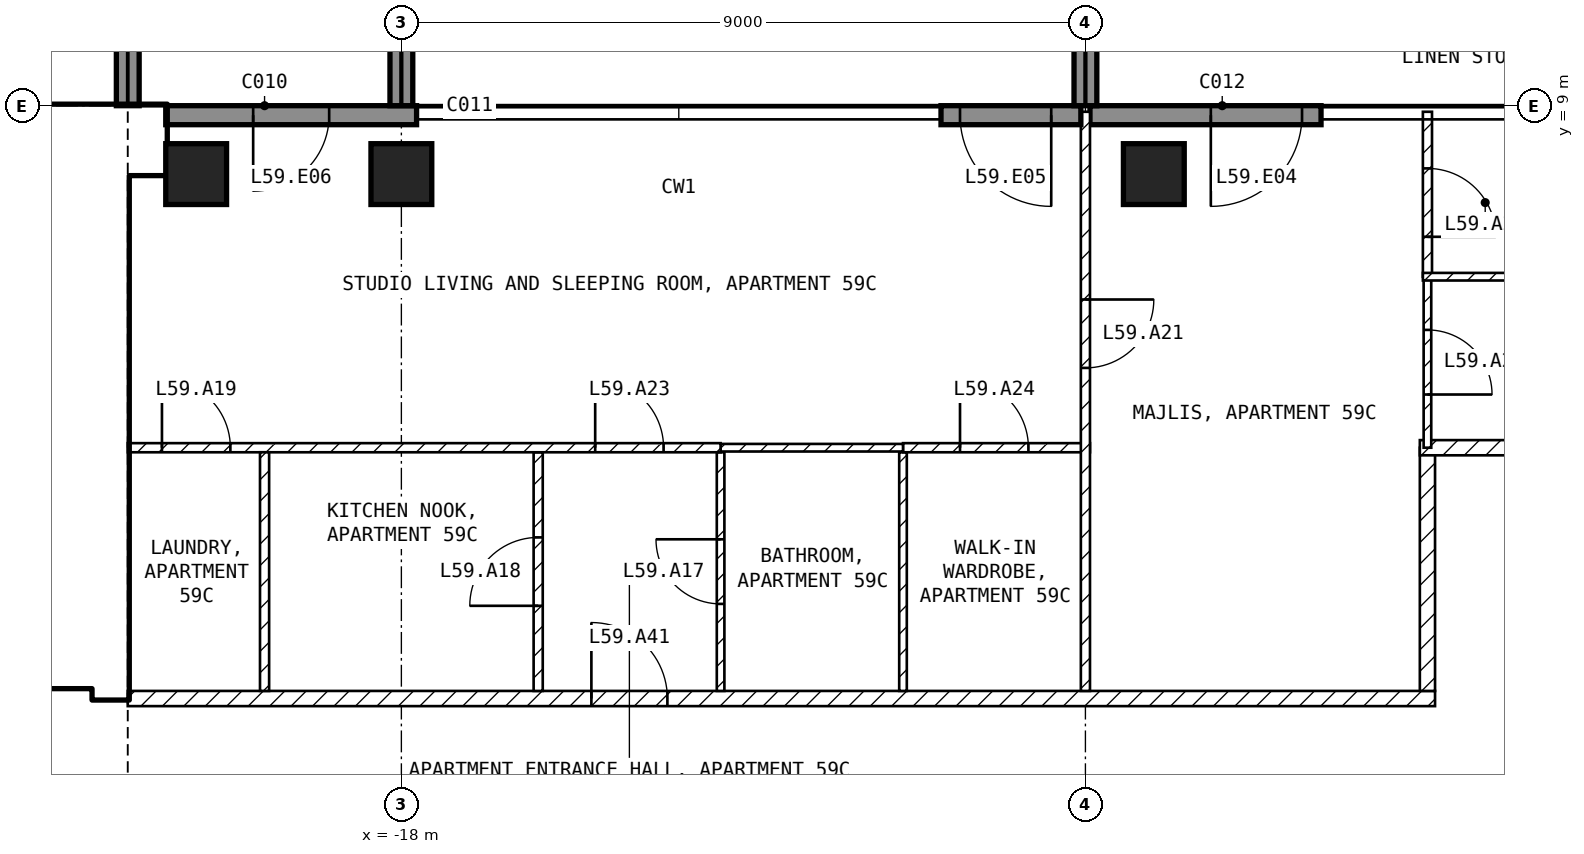
"""IFC4 building model, lengths in metres.
Left out: names, types, materials, properties, quantities, classifications, styles, units other than length and angle.
Written with IfcOpenShell. Run it as: python <this file> out.ifc"""

import sys

from ifc_helpers import new_model, si_unit, direction, frame, frame_2d, origin, origin_2d, place, context, subcontext, project, spatial, rectangle, extrude, element, fill, save


model = new_model("IFC4")
c1 = context("Model", 3, precision=1e-05, world=origin(), true_north=direction((0.0, 1.0)))
c2 = subcontext(c1, "Body", "Model", "MODEL_VIEW")
j1 = project(units=[si_unit("LENGTHUNIT", "METRE"), si_unit("PLANEANGLEUNIT", "RADIAN")], contexts=[c1])
p1 = place(None, origin())
s1 = spatial("IfcSite", under=j1, at=p1, CompositionType="ELEMENT")
p2 = place(p1, origin())
s2 = spatial("IfcBuilding", under=s1, at=p2, CompositionType="ELEMENT")
p3 = place(p2, frame((0.0, 0.0, 236.0)))
s3 = spatial("IfcBuildingStorey", under=s2, at=p3, CompositionType="ELEMENT", Elevation=236.0)
for number, where, z_axis, x_axis in (
    (1, (-20.7, 8.1, -0.25), (0.0, 0.0, 1.0), (1.0, 0.0, 0.0)),
    (2, (-18.0, 8.1, -0.25), (0.0, 0.0, 1.0), (1.0, 0.0, 0.0)),
    (3, (-8.1, 8.1, -0.25), (0.0, 0.0, 1.0), (1.0, 0.0, 0.0)),
):
    element("IfcColumn", number, at=place(p3, frame(where, z_axis=z_axis, x_axis=x_axis)), inside=s3, PredefinedType="COLUMN", context=c2, shape_type="SweptSolid", body=[
        extrude(rectangle(XDim=0.8, YDim=0.8, at=origin_2d()), origin(), (0.0, 0.0, 1.0), 3.5),
    ])
p4 = place(p3, frame((-5.9, 8.875, 0.0), z_axis=(0.0, 0.0, 1.0), x_axis=(-1.0, 0.0, 0.0)))
e4 = element("IfcWall", 4, at=p4, inside=s3, PredefinedType="SOLIDWALL", context=c2, shape_type="SweptSolid", body=[
    extrude(rectangle(XDim=3.04, YDim=0.25, at=frame_2d((1.52, 0.0))), origin(), (0.0, 0.0, 1.0), 3.25),
])
p5 = place(p4, frame((0.25, 0.0, 0.0)))
e5 = element("IfcOpeningElement", 5, at=p5, cuts=e4, PredefinedType="OPENING", context=c2, shape_type="SweptSolid", body=[
    extrude(rectangle(XDim=1.2, YDim=2.4, at=frame_2d((0.6, 1.2))), frame((0.0, 0.135, 0.0), z_axis=(0.0, -1.0, 0.0), x_axis=(1.0, 0.0, 0.0)), (0.0, 0.0, 1.0), 0.27),
])
p6 = place(p3, frame((-9.06, 8.875, 0.0), z_axis=(0.0, 0.0, 1.0), x_axis=(-1.0, 0.0, 0.0)))
e6 = element("IfcWall", 6, at=p6, inside=s3, PredefinedType="SOLIDWALL", context=c2, shape_type="SweptSolid", body=[
    extrude(rectangle(XDim=1.84, YDim=0.25, at=frame_2d((0.92, 0.0))), origin(), (0.0, 0.0, 1.0), 3.25),
])
p7 = place(p6, frame((0.39, 0.0, 0.0)))
e7 = element("IfcOpeningElement", 7, at=p7, cuts=e6, PredefinedType="OPENING", context=c2, shape_type="SweptSolid", body=[
    extrude(rectangle(XDim=1.2, YDim=2.4, at=frame_2d((0.6, 1.2))), frame((0.0, 0.135, 0.0), z_axis=(0.0, -1.0, 0.0), x_axis=(1.0, 0.0, 0.0)), (0.0, 0.0, 1.0), 0.27),
])
p8 = place(p3, frame((-17.8, 8.875, 0.0), z_axis=(0.0, 0.0, 1.0), x_axis=(-1.0, 0.0, 0.0)))
e8 = element("IfcWall", 8, at=p8, inside=s3, PredefinedType="SOLIDWALL", context=c2, shape_type="SweptSolid", body=[
    extrude(rectangle(XDim=3.3, YDim=0.25, at=frame_2d((1.65, 0.0))), origin(), (0.0, 0.0, 1.0), 3.25),
])
p9 = place(p8, frame((1.15, 0.0, 0.0)))
e9 = element("IfcOpeningElement", 9, at=p9, cuts=e8, PredefinedType="OPENING", context=c2, shape_type="SweptSolid", body=[
    extrude(rectangle(XDim=1.0, YDim=2.4, at=frame_2d((0.5, 1.2))), frame((0.0, 0.135, 0.0), z_axis=(0.0, -1.0, 0.0), x_axis=(1.0, 0.0, 0.0)), (0.0, 0.0, 1.0), 0.27),
])
for number, where, z_axis, x_axis in (
    (10, (-21.6, 9.0, 0.0), (0.0, 0.0, 1.0), (0.0, 1.0, 0.0)),
    (11, (-18.0, 9.0, 0.0), (0.0, 0.0, 1.0), (0.0, 1.0, 0.0)),
    (12, (-9.0, 9.0, 0.0), (0.0, 0.0, 1.0), (0.0, 1.0, 0.0)),
):
    element("IfcWall", number, at=place(p3, frame(where, z_axis=z_axis, x_axis=x_axis)), inside=s3, PredefinedType="SOLIDWALL", context=c2, shape_type="SweptSolid", body=[
        extrude(rectangle(XDim=2.7, YDim=0.3, at=frame_2d((1.35, 0.0))), origin(), (0.0, 0.0, 1.0), 3.25),
    ])
p10 = place(p3, frame((-29.75, 8.55, 0.0), z_axis=(0.0, 0.0, 1.0), x_axis=(1.0, 0.0, 0.0)))
e13 = element("IfcWall", 13, at=p10, inside=s3, PredefinedType="SHEAR", context=c2, shape_type="SweptSolid", body=[
    extrude(rectangle(XDim=8.65, YDim=0.9, at=frame_2d((4.325, 0.0))), origin(), (0.0, 0.0, 1.0), 3.25),
])
p11 = place(p3, frame((-21.825, 1.2, 0.0), z_axis=(0.0, 0.0, 1.0), x_axis=(0.0, 1.0, 0.0)))
e14 = element("IfcWall", 14, at=p11, inside=s3, PredefinedType="SHEAR", context=c2, shape_type="SweptSolid", body=[
    extrude(rectangle(XDim=6.9, YDim=0.45, at=frame_2d((3.45, 0.0))), origin(), (0.0, 0.0, 1.0), 3.25),
])
p12 = place(p3, frame((-33.35, 1.45, 0.0), z_axis=(0.0, 0.0, 1.0), x_axis=(1.0, 0.0, 0.0)))
e15 = element("IfcWall", 15, at=p12, inside=s3, PredefinedType="SOLIDWALL", context=c2, shape_type="SweptSolid", body=[
    extrude(rectangle(XDim=11.3, YDim=0.2, at=frame_2d((5.65, 0.0))), origin(), (0.0, 0.0, 1.0), 3.25),
])
p13 = place(p12, frame((9.55, 0.0, 0.0)))
e16 = element("IfcOpeningElement", 16, at=p13, cuts=e15, PredefinedType="OPENING", context=c2, shape_type="SweptSolid", body=[
    extrude(rectangle(XDim=1.0, YDim=2.1, at=frame_2d((0.5, 1.05))), frame((0.0, 0.11, 0.0), z_axis=(0.0, -1.0, 0.0), x_axis=(1.0, 0.0, 0.0)), (0.0, 0.0, 1.0), 0.22),
])
p14 = place(p12, frame((7.05, 0.0, 0.0)))
e17 = element("IfcOpeningElement", 17, at=p14, cuts=e15, PredefinedType="OPENING", context=c2, shape_type="SweptSolid", body=[
    extrude(rectangle(XDim=1.0, YDim=2.1, at=frame_2d((0.5, 1.05))), frame((0.0, 0.11, 0.0), z_axis=(0.0, -1.0, 0.0), x_axis=(1.0, 0.0, 0.0)), (0.0, 0.0, 1.0), 0.22),
])
p15 = place(p12, frame((1.175, 0.0, 0.0)))
e18 = element("IfcOpeningElement", 18, at=p15, cuts=e15, PredefinedType="OPENING", context=c2, shape_type="SweptSolid", body=[
    extrude(rectangle(XDim=0.9, YDim=2.1, at=frame_2d((0.45, 1.05))), frame((0.0, 0.11, 0.0), z_axis=(0.0, -1.0, 0.0), x_axis=(1.0, 0.0, 0.0)), (0.0, 0.0, 1.0), 0.22),
])
p16 = place(p3, frame((-28.35, 5.15, 0.0), z_axis=(0.0, 0.0, 1.0), x_axis=(1.0, 0.0, 0.0)))
e19 = element("IfcWall", 19, at=p16, inside=s3, PredefinedType="SOLIDWALL", context=c2, shape_type="SweptSolid", body=[
    extrude(rectangle(XDim=6.3, YDim=0.2, at=frame_2d((3.15, 0.0))), origin(), (0.0, 0.0, 1.0), 3.25),
])
p17 = place(p16, frame((5.1, 0.0, 0.0)))
e20 = element("IfcOpeningElement", 20, at=p17, cuts=e19, PredefinedType="OPENING", context=c2, shape_type="SweptSolid", body=[
    extrude(rectangle(XDim=1.0, YDim=2.1, at=frame_2d((0.5, 1.05))), frame((0.0, 0.11, 0.0), z_axis=(0.0, -1.0, 0.0), x_axis=(1.0, 0.0, 0.0)), (0.0, 0.0, 1.0), 0.22),
])
p18 = place(p3, frame((-21.6, 1.2, 0.0), z_axis=(0.0, 0.0, 1.0), x_axis=(1.0, 0.0, 0.0)))
e21 = element("IfcWall", 21, at=p18, inside=s3, PredefinedType="PARTITIONING", context=c2, shape_type="SweptSolid", body=[
    extrude(rectangle(XDim=17.2, YDim=0.2, at=frame_2d((8.6, 0.0))), origin(), (0.0, 0.0, 1.0), 3.25),
])
p19 = place(p18, frame((6.1, 0.0, 0.0)))
e22 = element("IfcOpeningElement", 22, at=p19, cuts=e21, PredefinedType="OPENING", context=c2, shape_type="SweptSolid", body=[
    extrude(rectangle(XDim=1.0, YDim=2.1, at=frame_2d((0.5, 1.05))), frame((0.0, 0.11, 0.0), z_axis=(0.0, -1.0, 0.0), x_axis=(1.0, 0.0, 0.0)), (0.0, 0.0, 1.0), 0.22),
])
p20 = place(p3, frame((-4.5, 1.3, 0.0), z_axis=(0.0, 0.0, 1.0), x_axis=(0.0, 1.0, 0.0)))
e23 = element("IfcWall", 23, at=p20, inside=s3, PredefinedType="PARTITIONING", context=c2, shape_type="SweptSolid", body=[
    extrude(rectangle(XDim=3.2, YDim=0.2, at=frame_2d((1.6, 0.0))), origin(), (0.0, 0.0, 1.0), 3.25),
])
p21 = place(p3, frame((-4.6, 4.5, 0.0), z_axis=(0.0, 0.0, 1.0), x_axis=(1.0, 0.0, 0.0)))
e24 = element("IfcWall", 24, at=p21, inside=s3, PredefinedType="PARTITIONING", context=c2, shape_type="SweptSolid", body=[
    extrude(rectangle(XDim=3.5, YDim=0.2, at=frame_2d((1.75, 0.0))), origin(), (0.0, 0.0, 1.0), 3.25),
])
p22 = place(p3, frame((-11.4, 1.3, 0.0), z_axis=(0.0, 0.0, 1.0), x_axis=(0.0, 1.0, 0.0)))
e25 = element("IfcWall", 25, at=p22, inside=s3, PredefinedType="PARTITIONING", context=c2, shape_type="SweptSolid", body=[
    extrude(rectangle(XDim=3.14, YDim=0.1, at=frame_2d((1.57, 0.0))), origin(), (0.0, 0.0, 1.0), 3.25),
])
p23 = place(p3, frame((-11.4, 4.5, 0.0), z_axis=(0.0, 0.0, 1.0), x_axis=(1.0, 0.0, 0.0)))
e26 = element("IfcWall", 26, at=p23, inside=s3, PredefinedType="PARTITIONING", context=c2, shape_type="SweptSolid", body=[
    extrude(rectangle(XDim=2.46, YDim=0.12, at=frame_2d((1.23, 0.0))), origin(), (0.0, 0.0, 1.0), 3.25),
])
p24 = place(p23, frame((0.75, 0.0, 0.0)))
e27 = element("IfcOpeningElement", 27, at=p24, cuts=e26, PredefinedType="OPENING", context=c2, shape_type="SweptSolid", body=[
    extrude(rectangle(XDim=0.9, YDim=2.1, at=frame_2d((0.45, 1.05))), frame((0.0, 0.07, 0.0), z_axis=(0.0, -1.0, 0.0), x_axis=(1.0, 0.0, 0.0)), (0.0, 0.0, 1.0), 0.14),
])
p25 = place(p3, frame((-9.0, 8.92, 0.0), z_axis=(0.0, 0.0, 1.0), x_axis=(0.0, -1.0, 0.0)))
e28 = element("IfcWall", 28, at=p25, inside=s3, PredefinedType="PARTITIONING", context=c2, shape_type="SweptSolid", body=[
    extrude(rectangle(XDim=7.62, YDim=0.12, at=frame_2d((3.81, 0.0))), origin(), (0.0, 0.0, 1.0), 3.25),
])
p26 = place(p25, frame((2.47, 0.0, 0.0)))
e29 = element("IfcOpeningElement", 29, at=p26, cuts=e28, PredefinedType="OPENING", context=c2, shape_type="SweptSolid", body=[
    extrude(rectangle(XDim=0.9, YDim=2.1, at=frame_2d((0.45, 1.05))), frame((0.0, 0.07, 0.0), z_axis=(0.0, -1.0, 0.0), x_axis=(1.0, 0.0, 0.0)), (0.0, 0.0, 1.0), 0.14),
])
p27 = place(p3, frame((-13.8, 1.3, 0.0), z_axis=(0.0, 0.0, 1.0), x_axis=(0.0, 1.0, 0.0)))
e30 = element("IfcWall", 30, at=p27, inside=s3, PredefinedType="PARTITIONING", context=c2, shape_type="SweptSolid", body=[
    extrude(rectangle(XDim=3.14, YDim=0.1, at=frame_2d((1.57, 0.0))), origin(), (0.0, 0.0, 1.0), 3.25),
])
p28 = place(p27, frame((1.145, 0.0, 0.0)))
e31 = element("IfcOpeningElement", 31, at=p28, cuts=e30, PredefinedType="OPENING", context=c2, shape_type="SweptSolid", body=[
    extrude(rectangle(XDim=0.85, YDim=2.1, at=frame_2d((0.425, 1.05))), frame((0.0, 0.06, 0.0), z_axis=(0.0, -1.0, 0.0), x_axis=(1.0, 0.0, 0.0)), (0.0, 0.0, 1.0), 0.12),
])
p29 = place(p3, frame((-13.8, 4.5, 0.0), z_axis=(0.0, 0.0, 1.0), x_axis=(1.0, 0.0, 0.0)))
e32 = element("IfcWall", 32, at=p29, inside=s3, PredefinedType="PARTITIONING", context=c2, shape_type="SweptSolid", body=[
    extrude(rectangle(XDim=2.4, YDim=0.1, at=frame_2d((1.2, 0.0))), origin(), (0.0, 0.0, 1.0), 3.25),
])
p30 = place(p3, frame((-16.2, 1.3, 0.0), z_axis=(0.0, 0.0, 1.0), x_axis=(0.0, 1.0, 0.0)))
e33 = element("IfcWall", 33, at=p30, inside=s3, PredefinedType="PARTITIONING", context=c2, shape_type="SweptSolid", body=[
    extrude(rectangle(XDim=3.14, YDim=0.12, at=frame_2d((1.57, 0.0))), origin(), (0.0, 0.0, 1.0), 3.25),
])
p31 = place(p30, frame((1.12, 0.0, 0.0)))
e34 = element("IfcOpeningElement", 34, at=p31, cuts=e33, PredefinedType="OPENING", context=c2, shape_type="SweptSolid", body=[
    extrude(rectangle(XDim=0.9, YDim=2.1, at=frame_2d((0.45, 1.05))), frame((0.0, 0.07, 0.0), z_axis=(0.0, -1.0, 0.0), x_axis=(1.0, 0.0, 0.0)), (0.0, 0.0, 1.0), 0.14),
])
p32 = place(p3, frame((-21.6, 4.5, 0.0), z_axis=(0.0, 0.0, 1.0), x_axis=(1.0, 0.0, 0.0)))
e35 = element("IfcWall", 35, at=p32, inside=s3, PredefinedType="PARTITIONING", context=c2, shape_type="SweptSolid", body=[
    extrude(rectangle(XDim=7.8, YDim=0.12, at=frame_2d((3.9, 0.0))), origin(), (0.0, 0.0, 1.0), 3.25),
])
p33 = place(p32, frame((0.45, 0.0, 0.0)))
e36 = element("IfcOpeningElement", 36, at=p33, cuts=e35, PredefinedType="OPENING", context=c2, shape_type="SweptSolid", body=[
    extrude(rectangle(XDim=0.9, YDim=2.1, at=frame_2d((0.45, 1.05))), frame((0.0, 0.07, 0.0), z_axis=(0.0, -1.0, 0.0), x_axis=(1.0, 0.0, 0.0)), (0.0, 0.0, 1.0), 0.14),
])
p34 = place(p32, frame((6.15, 0.0, 0.0)))
e37 = element("IfcOpeningElement", 37, at=p34, cuts=e35, PredefinedType="OPENING", context=c2, shape_type="SweptSolid", body=[
    extrude(rectangle(XDim=0.9, YDim=2.1, at=frame_2d((0.45, 1.05))), frame((0.0, 0.07, 0.0), z_axis=(0.0, -1.0, 0.0), x_axis=(1.0, 0.0, 0.0)), (0.0, 0.0, 1.0), 0.14),
])
p35 = place(p3, frame((-19.8, 1.3, 0.0), z_axis=(0.0, 0.0, 1.0), x_axis=(0.0, 1.0, 0.0)))
e38 = element("IfcWall", 38, at=p35, inside=s3, PredefinedType="PARTITIONING", context=c2, shape_type="SweptSolid", body=[
    extrude(rectangle(XDim=3.14, YDim=0.12, at=frame_2d((1.57, 0.0))), origin(), (0.0, 0.0, 1.0), 3.25),
])
p36 = place(p3, frame((-4.5, 6.75, 0.0), z_axis=(0.0, 0.0, 1.0), x_axis=(0.0, -1.0, 0.0)))
e39 = element("IfcWall", 39, at=p36, inside=s3, PredefinedType="PARTITIONING", context=c2, shape_type="SweptSolid", body=[
    extrude(rectangle(XDim=2.25, YDim=0.1, at=frame_2d((1.125, 0.0))), origin(), (0.0, 0.0, 1.0), 3.25),
])
p37 = place(p36, frame((0.7, 0.0, 0.0)))
e40 = element("IfcOpeningElement", 40, at=p37, cuts=e39, PredefinedType="OPENING", context=c2, shape_type="SweptSolid", body=[
    extrude(rectangle(XDim=0.85, YDim=2.1, at=frame_2d((0.425, 1.05))), frame((0.0, 0.06, 0.0), z_axis=(0.0, -1.0, 0.0), x_axis=(1.0, 0.0, 0.0)), (0.0, 0.0, 1.0), 0.12),
])
p38 = place(p3, frame((-4.5, 8.92, 0.0), z_axis=(0.0, 0.0, 1.0), x_axis=(0.0, -1.0, 0.0)))
e41 = element("IfcWall", 41, at=p38, inside=s3, PredefinedType="PARTITIONING", context=c2, shape_type="SweptSolid", body=[
    extrude(rectangle(XDim=2.17, YDim=0.12, at=frame_2d((1.085, 0.0))), origin(), (0.0, 0.0, 1.0), 3.25),
])
p39 = place(p38, frame((0.745, 0.0, 0.0)))
e42 = element("IfcOpeningElement", 42, at=p39, cuts=e41, PredefinedType="OPENING", context=c2, shape_type="SweptSolid", body=[
    extrude(rectangle(XDim=0.9, YDim=2.1, at=frame_2d((0.45, 1.05))), frame((0.0, 0.07, 0.0), z_axis=(0.0, -1.0, 0.0), x_axis=(1.0, 0.0, 0.0)), (0.0, 0.0, 1.0), 0.14),
])
p40 = place(p3, frame((-4.56, 6.75, 0.0), z_axis=(0.0, 0.0, 1.0), x_axis=(1.0, 0.0, 0.0)))
e43 = element("IfcWall", 43, at=p40, inside=s3, PredefinedType="PARTITIONING", context=c2, shape_type="SweptSolid", body=[
    extrude(rectangle(XDim=3.46, YDim=0.1, at=frame_2d((1.73, 0.0))), origin(), (0.0, 0.0, 1.0), 3.25),
])
p41 = place(p5, origin())
e44 = element("IfcDoor", 44, at=p41, inside=s3, OperationType="SINGLE_SWING_RIGHT", PredefinedType="DOOR", context=c2, shape_type="SweptSolid", body=[
    extrude(rectangle(XDim=1.2, YDim=2.4, at=frame_2d((0.6, 1.2))), frame((0.0, 0.025, 0.0), z_axis=(0.0, -1.0, 0.0), x_axis=(1.0, 0.0, 0.0)), (0.0, 0.0, 1.0), 0.05),
])
fill(e5, e44)
p42 = place(p7, origin())
e45 = element("IfcDoor", 45, at=p42, inside=s3, OperationType="SINGLE_SWING_LEFT", PredefinedType="DOOR", context=c2, shape_type="SweptSolid", body=[
    extrude(rectangle(XDim=1.2, YDim=2.4, at=frame_2d((0.6, 1.2))), frame((0.0, 0.025, 0.0), z_axis=(0.0, -1.0, 0.0), x_axis=(1.0, 0.0, 0.0)), (0.0, 0.0, 1.0), 0.05),
])
fill(e7, e45)
p43 = place(p9, origin())
e46 = element("IfcDoor", 46, at=p43, inside=s3, OperationType="SINGLE_SWING_RIGHT", PredefinedType="DOOR", context=c2, shape_type="SweptSolid", body=[
    extrude(rectangle(XDim=1.0, YDim=2.4, at=frame_2d((0.5, 1.2))), frame((0.0, 0.025, 0.0), z_axis=(0.0, -1.0, 0.0), x_axis=(1.0, 0.0, 0.0)), (0.0, 0.0, 1.0), 0.05),
])
fill(e9, e46)
p44 = place(p17, origin())
e47 = element("IfcDoor", 47, at=p44, inside=s3, OperationType="SINGLE_SWING_LEFT", PredefinedType="DOOR", context=c2, shape_type="SweptSolid", body=[
    extrude(rectangle(XDim=1.0, YDim=2.1, at=frame_2d((0.5, 1.05))), frame((0.0, 0.025, 0.0), z_axis=(0.0, -1.0, 0.0), x_axis=(1.0, 0.0, 0.0)), (0.0, 0.0, 1.0), 0.05),
])
fill(e20, e47)
p45 = place(p28, origin())
e48 = element("IfcDoor", 48, at=p45, inside=s3, OperationType="SINGLE_SWING_RIGHT", PredefinedType="DOOR", context=c2, shape_type="SweptSolid", body=[
    extrude(rectangle(XDim=0.85, YDim=2.1, at=frame_2d((0.425, 1.05))), frame((0.0, 0.025, 0.0), z_axis=(0.0, -1.0, 0.0), x_axis=(1.0, 0.0, 0.0)), (0.0, 0.0, 1.0), 0.05),
])
fill(e31, e48)
p46 = place(p31, origin())
e49 = element("IfcDoor", 49, at=p46, inside=s3, OperationType="SINGLE_SWING_LEFT", PredefinedType="DOOR", context=c2, shape_type="SweptSolid", body=[
    extrude(rectangle(XDim=0.9, YDim=2.1, at=frame_2d((0.45, 1.05))), frame((0.0, 0.025, 0.0), z_axis=(0.0, -1.0, 0.0), x_axis=(1.0, 0.0, 0.0)), (0.0, 0.0, 1.0), 0.05),
])
fill(e34, e49)
p47 = place(p33, origin())
e50 = element("IfcDoor", 50, at=p47, inside=s3, OperationType="SINGLE_SWING_LEFT", PredefinedType="DOOR", context=c2, shape_type="SweptSolid", body=[
    extrude(rectangle(XDim=0.9, YDim=2.1, at=frame_2d((0.45, 1.05))), frame((0.0, 0.025, 0.0), z_axis=(0.0, -1.0, 0.0), x_axis=(1.0, 0.0, 0.0)), (0.0, 0.0, 1.0), 0.05),
])
fill(e36, e50)
p48 = place(p39, origin())
e51 = element("IfcDoor", 51, at=p48, inside=s3, OperationType="SINGLE_SWING_RIGHT", PredefinedType="DOOR", context=c2, shape_type="SweptSolid", body=[
    extrude(rectangle(XDim=0.9, YDim=2.1, at=frame_2d((0.45, 1.05))), frame((0.0, 0.025, 0.0), z_axis=(0.0, -1.0, 0.0), x_axis=(1.0, 0.0, 0.0)), (0.0, 0.0, 1.0), 0.05),
])
fill(e42, e51)
p49 = place(p26, origin())
e52 = element("IfcDoor", 52, at=p49, inside=s3, OperationType="SINGLE_SWING_LEFT", PredefinedType="DOOR", context=c2, shape_type="SweptSolid", body=[
    extrude(rectangle(XDim=0.9, YDim=2.1, at=frame_2d((0.45, 1.05))), frame((0.0, 0.025, 0.0), z_axis=(0.0, -1.0, 0.0), x_axis=(1.0, 0.0, 0.0)), (0.0, 0.0, 1.0), 0.05),
])
fill(e29, e52)
p50 = place(p37, origin())
e53 = element("IfcDoor", 53, at=p50, inside=s3, OperationType="SINGLE_SWING_RIGHT", PredefinedType="DOOR", context=c2, shape_type="SweptSolid", body=[
    extrude(rectangle(XDim=0.85, YDim=2.1, at=frame_2d((0.425, 1.05))), frame((0.0, 0.025, 0.0), z_axis=(0.0, -1.0, 0.0), x_axis=(1.0, 0.0, 0.0)), (0.0, 0.0, 1.0), 0.05),
])
fill(e40, e53)
p51 = place(p34, origin())
e54 = element("IfcDoor", 54, at=p51, inside=s3, OperationType="SINGLE_SWING_LEFT", PredefinedType="DOOR", context=c2, shape_type="SweptSolid", body=[
    extrude(rectangle(XDim=0.9, YDim=2.1, at=frame_2d((0.45, 1.05))), frame((0.0, 0.025, 0.0), z_axis=(0.0, -1.0, 0.0), x_axis=(1.0, 0.0, 0.0)), (0.0, 0.0, 1.0), 0.05),
])
fill(e37, e54)
p52 = place(p24, origin())
e55 = element("IfcDoor", 55, at=p52, inside=s3, OperationType="SINGLE_SWING_LEFT", PredefinedType="DOOR", context=c2, shape_type="SweptSolid", body=[
    extrude(rectangle(XDim=0.9, YDim=2.1, at=frame_2d((0.45, 1.05))), frame((0.0, 0.025, 0.0), z_axis=(0.0, -1.0, 0.0), x_axis=(1.0, 0.0, 0.0)), (0.0, 0.0, 1.0), 0.05),
])
fill(e27, e55)
p53 = place(p19, origin())
e56 = element("IfcDoor", 56, at=p53, inside=s3, OperationType="SINGLE_SWING_LEFT", PredefinedType="DOOR", context=c2, shape_type="SweptSolid", body=[
    extrude(rectangle(XDim=1.0, YDim=2.1, at=frame_2d((0.5, 1.05))), frame((0.0, 0.025, 0.0), z_axis=(0.0, -1.0, 0.0), x_axis=(1.0, 0.0, 0.0)), (0.0, 0.0, 1.0), 0.05),
])
fill(e22, e56)
save(model, sys.argv[1])
